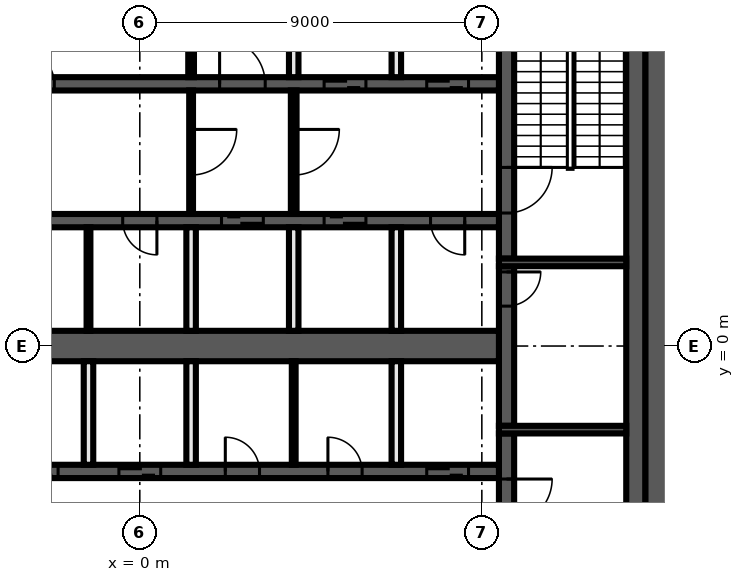
"""IFC4 building model, lengths in metres.
Left out: names, types, materials, properties, quantities, classifications, styles, units other than length and angle.
Written with IfcOpenShell. Run it as: python <this file> out.ifc"""

import sys

from ifc_helpers import new_model, si_unit, direction, frame, frame_2d, origin, place, context, subcontext, project, spatial, rectangle, extrude, element, fill, save


model = new_model("IFC4")
c1 = context("Model", 3, precision=1e-05, world=origin(), true_north=direction((0.0, 1.0)))
c2 = subcontext(c1, "Body", "Model", "MODEL_VIEW")
j1 = project(units=[si_unit("LENGTHUNIT", "METRE"), si_unit("PLANEANGLEUNIT", "RADIAN")], contexts=[c1])
p1 = place(None, origin())
s1 = spatial("IfcSite", under=j1, at=p1, CompositionType="ELEMENT")
p2 = place(p1, origin())
s2 = spatial("IfcBuilding", under=s1, at=p2, CompositionType="ELEMENT")
p3 = place(p2, frame((0.0, 0.0, 253.8)))
s3 = spatial("IfcBuildingStorey", under=s2, at=p3, CompositionType="ELEMENT", Elevation=253.8)
p4 = place(p3, frame((13.65, 10.3, 0.0), z_axis=(0.0, 0.0, 1.0), x_axis=(0.0, -1.0, 0.0)))
e1 = element("IfcWall", 1, at=p4, inside=s3, PredefinedType="SHEAR", context=c2, shape_type="SweptSolid", body=[
    extrude(rectangle(XDim=20.6, YDim=0.7, at=frame_2d((10.3, 0.0))), origin(), (0.0, 0.0, 1.0), 3.82),
])
p5 = place(p3, frame((13.05, 9.8, 0.0), z_axis=(0.0, 0.0, 1.0), x_axis=(0.0, -1.0, 0.0)))
e2 = element("IfcWall", 2, at=p5, inside=s3, PredefinedType="SHEAR", context=c2, shape_type="SweptSolid", body=[
    extrude(rectangle(XDim=19.6, YDim=0.5, at=frame_2d((9.8, 0.0))), origin(), (0.0, 0.0, 1.0), 3.82),
])
p6 = place(p3, frame((9.65, -2.3, 0.0), z_axis=(0.0, 0.0, 1.0), x_axis=(0.0, -1.0, 0.0)))
e3 = element("IfcWall", 3, at=p6, inside=s3, PredefinedType="SHEAR", context=c2, shape_type="SweptSolid", body=[
    extrude(rectangle(XDim=7.5, YDim=0.4, at=frame_2d((3.75, 0.0))), origin(), (0.0, 0.0, 1.0), 3.82),
])
p7 = place(p6, frame((1.2, 0.0, 0.0)))
e4 = element("IfcOpeningElement", 4, at=p7, cuts=e3, PredefinedType="OPENING", context=c2, shape_type="SweptSolid", body=[
    extrude(rectangle(XDim=1.2, YDim=2.1, at=frame_2d((0.6, 1.05))), frame((0.0, 0.21, 0.0), z_axis=(0.0, -1.0, 0.0), x_axis=(1.0, 0.0, 0.0)), (0.0, 0.0, 1.0), 0.42),
])
p8 = place(p3, frame((9.65, 2.1, 0.0), z_axis=(0.0, 0.0, 1.0), x_axis=(0.0, -1.0, 0.0)))
e5 = element("IfcWall", 5, at=p8, inside=s3, PredefinedType="SHEAR", context=c2, shape_type="SweptSolid", body=[
    extrude(rectangle(XDim=4.2, YDim=0.4, at=frame_2d((2.1, 0.0))), origin(), (0.0, 0.0, 1.0), 3.82),
])
p9 = place(p8, frame((0.15, 0.0, 0.0)))
e6 = element("IfcOpeningElement", 6, at=p9, cuts=e5, PredefinedType="OPENING", context=c2, shape_type="SweptSolid", body=[
    extrude(rectangle(XDim=0.9, YDim=2.1, at=frame_2d((0.45, 1.05))), frame((0.0, 0.21, 0.0), z_axis=(0.0, -1.0, 0.0), x_axis=(1.0, 0.0, 0.0)), (0.0, 0.0, 1.0), 0.42),
])
p10 = place(p3, frame((9.65, 9.8, 0.0), z_axis=(0.0, 0.0, 1.0), x_axis=(0.0, -1.0, 0.0)))
e7 = element("IfcWall", 7, at=p10, inside=s3, PredefinedType="SHEAR", context=c2, shape_type="SweptSolid", body=[
    extrude(rectangle(XDim=7.5, YDim=0.4, at=frame_2d((3.75, 0.0))), origin(), (0.0, 0.0, 1.0), 3.82),
])
p11 = place(p10, frame((5.1, 0.0, 0.0)))
e8 = element("IfcOpeningElement", 8, at=p11, cuts=e7, PredefinedType="OPENING", context=c2, shape_type="SweptSolid", body=[
    extrude(rectangle(XDim=1.2, YDim=2.1, at=frame_2d((0.6, 1.05))), frame((0.0, 0.21, 0.0), z_axis=(0.0, -1.0, 0.0), x_axis=(1.0, 0.0, 0.0)), (0.0, 0.0, 1.0), 0.42),
])
for number, where, z_axis, x_axis in (
    (9, (9.45, 2.2, 0.0), (0.0, 0.0, 1.0), (1.0, 0.0, 0.0)),
    (10, (9.45, -2.2, 0.0), (0.0, 0.0, 1.0), (1.0, 0.0, 0.0)),
):
    element("IfcWall", number, at=place(p3, frame(where, z_axis=z_axis, x_axis=x_axis)), inside=s3, PredefinedType="SHEAR", context=c2, shape_type="SweptSolid", body=[
        extrude(rectangle(XDim=3.35, YDim=0.2, at=frame_2d((1.675, 0.0))), origin(), (0.0, 0.0, 1.0), 3.82),
    ])
p12 = place(p3, frame((-9.45, 6.9, 0.0), z_axis=(0.0, 0.0, 1.0), x_axis=(1.0, 0.0, 0.0)))
e11 = element("IfcWall", 11, at=p12, inside=s3, PredefinedType="SHEAR", context=c2, shape_type="SweptSolid", body=[
    extrude(rectangle(XDim=18.9, YDim=0.35, at=frame_2d((9.45, 0.0))), origin(), (0.0, 0.0, 1.0), 3.82),
])
p13 = place(p12, frame((11.55, 0.0, 0.0)))
e12 = element("IfcOpeningElement", 12, at=p13, cuts=e11, PredefinedType="OPENING", context=c2, shape_type="SweptSolid", body=[
    extrude(rectangle(XDim=1.2, YDim=2.1, at=frame_2d((0.6, 1.05))), frame((0.0, 0.185, 0.0), z_axis=(0.0, -1.0, 0.0), x_axis=(1.0, 0.0, 0.0)), (0.0, 0.0, 1.0), 0.37),
])
p14 = place(p12, frame((14.3, 0.0, 0.0)))
e13 = element("IfcOpeningElement", 13, at=p14, cuts=e11, PredefinedType="OPENING", context=c2, shape_type="SweptSolid", body=[
    extrude(rectangle(XDim=1.1, YDim=2.1, at=frame_2d((0.55, 1.05))), frame((0.0, 0.185, 0.0), z_axis=(0.0, -1.0, 0.0), x_axis=(1.0, 0.0, 0.0)), (0.0, 0.0, 1.0), 0.37),
])
p15 = place(p12, frame((17.0, 0.0, 0.0)))
e14 = element("IfcOpeningElement", 14, at=p15, cuts=e11, PredefinedType="OPENING", context=c2, shape_type="SweptSolid", body=[
    extrude(rectangle(XDim=1.1, YDim=2.1, at=frame_2d((0.55, 1.05))), frame((0.0, 0.185, 0.0), z_axis=(0.0, -1.0, 0.0), x_axis=(1.0, 0.0, 0.0)), (0.0, 0.0, 1.0), 0.37),
])
p16 = place(p12, frame((0.9, 0.0, 0.0)))
e15 = element("IfcOpeningElement", 15, at=p16, cuts=e11, PredefinedType="OPENING", context=c2, shape_type="SweptSolid", body=[
    extrude(rectangle(XDim=0.9, YDim=2.1, at=frame_2d((0.45, 1.05))), frame((0.0, 0.185, 0.0), z_axis=(0.0, -1.0, 0.0), x_axis=(1.0, 0.0, 0.0)), (0.0, 0.0, 1.0), 0.37),
])
p17 = place(p12, frame((6.3, 0.0, 0.0)))
e16 = element("IfcOpeningElement", 16, at=p17, cuts=e11, PredefinedType="OPENING", context=c2, shape_type="SweptSolid", body=[
    extrude(rectangle(XDim=0.9, YDim=2.1, at=frame_2d((0.45, 1.05))), frame((0.0, 0.185, 0.0), z_axis=(0.0, -1.0, 0.0), x_axis=(1.0, 0.0, 0.0)), (0.0, 0.0, 1.0), 0.37),
])
p18 = place(p3, frame((9.45, 3.3, 0.0), z_axis=(0.0, 0.0, 1.0), x_axis=(-1.0, 0.0, 0.0)))
e17 = element("IfcWall", 17, at=p18, inside=s3, PredefinedType="SHEAR", context=c2, shape_type="SweptSolid", body=[
    extrude(rectangle(XDim=18.9, YDim=0.35, at=frame_2d((9.45, 0.0))), origin(), (0.0, 0.0, 1.0), 3.82),
])
p19 = place(p18, frame((6.2, 0.0, 0.0)))
e18 = element("IfcOpeningElement", 18, at=p19, cuts=e17, PredefinedType="OPENING", context=c2, shape_type="SweptSolid", body=[
    extrude(rectangle(XDim=1.1, YDim=2.1, at=frame_2d((0.55, 1.05))), frame((0.0, 0.185, 0.0), z_axis=(0.0, -1.0, 0.0), x_axis=(1.0, 0.0, 0.0)), (0.0, 0.0, 1.0), 0.37),
])
p20 = place(p18, frame((3.5, 0.0, 0.0)))
e19 = element("IfcOpeningElement", 19, at=p20, cuts=e17, PredefinedType="OPENING", context=c2, shape_type="SweptSolid", body=[
    extrude(rectangle(XDim=1.1, YDim=2.1, at=frame_2d((0.55, 1.05))), frame((0.0, 0.185, 0.0), z_axis=(0.0, -1.0, 0.0), x_axis=(1.0, 0.0, 0.0)), (0.0, 0.0, 1.0), 0.37),
])
p21 = place(p18, frame((0.9, 0.0, 0.0)))
e20 = element("IfcOpeningElement", 20, at=p21, cuts=e17, PredefinedType="OPENING", context=c2, shape_type="SweptSolid", body=[
    extrude(rectangle(XDim=0.9, YDim=2.1, at=frame_2d((0.45, 1.05))), frame((0.0, 0.185, 0.0), z_axis=(0.0, -1.0, 0.0), x_axis=(1.0, 0.0, 0.0)), (0.0, 0.0, 1.0), 0.37),
])
p22 = place(p18, frame((14.4, 0.0, 0.0)))
e21 = element("IfcOpeningElement", 21, at=p22, cuts=e17, PredefinedType="OPENING", context=c2, shape_type="SweptSolid", body=[
    extrude(rectangle(XDim=0.9, YDim=2.1, at=frame_2d((0.45, 1.05))), frame((0.0, 0.185, 0.0), z_axis=(0.0, -1.0, 0.0), x_axis=(1.0, 0.0, 0.0)), (0.0, 0.0, 1.0), 0.37),
])
p23 = place(p18, frame((9.0, 0.0, 0.0)))
e22 = element("IfcOpeningElement", 22, at=p23, cuts=e17, PredefinedType="OPENING", context=c2, shape_type="SweptSolid", body=[
    extrude(rectangle(XDim=0.9, YDim=2.1, at=frame_2d((0.45, 1.05))), frame((0.0, 0.185, 0.0), z_axis=(0.0, -1.0, 0.0), x_axis=(1.0, 0.0, 0.0)), (0.0, 0.0, 1.0), 0.37),
])
p24 = place(p3, frame((-9.45, -3.3, 0.0), z_axis=(0.0, 0.0, 1.0), x_axis=(1.0, 0.0, 0.0)))
e23 = element("IfcWall", 23, at=p24, inside=s3, PredefinedType="SHEAR", context=c2, shape_type="SweptSolid", body=[
    extrude(rectangle(XDim=18.9, YDim=0.35, at=frame_2d((9.45, 0.0))), origin(), (0.0, 0.0, 1.0), 3.82),
])
p25 = place(p24, frame((0.8, 0.0, 0.0)))
e24 = element("IfcOpeningElement", 24, at=p25, cuts=e23, PredefinedType="OPENING", context=c2, shape_type="SweptSolid", body=[
    extrude(rectangle(XDim=1.1, YDim=2.1, at=frame_2d((0.55, 1.05))), frame((0.0, 0.185, 0.0), z_axis=(0.0, -1.0, 0.0), x_axis=(1.0, 0.0, 0.0)), (0.0, 0.0, 1.0), 0.37),
])
p26 = place(p24, frame((3.5, 0.0, 0.0)))
e25 = element("IfcOpeningElement", 25, at=p26, cuts=e23, PredefinedType="OPENING", context=c2, shape_type="SweptSolid", body=[
    extrude(rectangle(XDim=1.1, YDim=2.1, at=frame_2d((0.55, 1.05))), frame((0.0, 0.185, 0.0), z_axis=(0.0, -1.0, 0.0), x_axis=(1.0, 0.0, 0.0)), (0.0, 0.0, 1.0), 0.37),
])
p27 = place(p24, frame((6.2, 0.0, 0.0)))
e26 = element("IfcOpeningElement", 26, at=p27, cuts=e23, PredefinedType="OPENING", context=c2, shape_type="SweptSolid", body=[
    extrude(rectangle(XDim=1.1, YDim=2.1, at=frame_2d((0.55, 1.05))), frame((0.0, 0.185, 0.0), z_axis=(0.0, -1.0, 0.0), x_axis=(1.0, 0.0, 0.0)), (0.0, 0.0, 1.0), 0.37),
])
p28 = place(p24, frame((8.9, 0.0, 0.0)))
e27 = element("IfcOpeningElement", 27, at=p28, cuts=e23, PredefinedType="OPENING", context=c2, shape_type="SweptSolid", body=[
    extrude(rectangle(XDim=1.1, YDim=2.1, at=frame_2d((0.55, 1.05))), frame((0.0, 0.185, 0.0), z_axis=(0.0, -1.0, 0.0), x_axis=(1.0, 0.0, 0.0)), (0.0, 0.0, 1.0), 0.37),
])
p29 = place(p24, frame((17.0, 0.0, 0.0)))
e28 = element("IfcOpeningElement", 28, at=p29, cuts=e23, PredefinedType="OPENING", context=c2, shape_type="SweptSolid", body=[
    extrude(rectangle(XDim=1.1, YDim=2.1, at=frame_2d((0.55, 1.05))), frame((0.0, 0.185, 0.0), z_axis=(0.0, -1.0, 0.0), x_axis=(1.0, 0.0, 0.0)), (0.0, 0.0, 1.0), 0.37),
])
p30 = place(p24, frame((11.7, 0.0, 0.0)))
e29 = element("IfcOpeningElement", 29, at=p30, cuts=e23, PredefinedType="OPENING", context=c2, shape_type="SweptSolid", body=[
    extrude(rectangle(XDim=0.9, YDim=2.1, at=frame_2d((0.45, 1.05))), frame((0.0, 0.185, 0.0), z_axis=(0.0, -1.0, 0.0), x_axis=(1.0, 0.0, 0.0)), (0.0, 0.0, 1.0), 0.37),
])
p31 = place(p24, frame((14.4, 0.0, 0.0)))
e30 = element("IfcOpeningElement", 30, at=p31, cuts=e23, PredefinedType="OPENING", context=c2, shape_type="SweptSolid", body=[
    extrude(rectangle(XDim=0.9, YDim=2.1, at=frame_2d((0.45, 1.05))), frame((0.0, 0.185, 0.0), z_axis=(0.0, -1.0, 0.0), x_axis=(1.0, 0.0, 0.0)), (0.0, 0.0, 1.0), 0.37),
])
p32 = place(p3, frame((-9.45, 0.0, 0.0), z_axis=(0.0, 0.0, 1.0), x_axis=(1.0, 0.0, 0.0)))
e31 = element("IfcWall", 31, at=p32, inside=s3, PredefinedType="SHEAR", context=c2, shape_type="SweptSolid", body=[
    extrude(rectangle(XDim=18.9, YDim=0.8, at=frame_2d((9.45, 0.0))), origin(), (0.0, 0.0, 1.0), 3.82),
])
for number, where, z_axis, x_axis in (
    (32, (6.75, -3.125, 0.0), (0.0, 0.0, 1.0), (0.0, 1.0, 0.0)),
    (33, (6.75, 0.4, 0.0), (0.0, 0.0, 1.0), (0.0, 1.0, 0.0)),
    (34, (6.75, 7.075, 0.0), (0.0, 0.0, 1.0), (0.0, 1.0, 0.0)),
):
    element("IfcWall", number, at=place(p3, frame(where, z_axis=z_axis, x_axis=x_axis)), inside=s3, PredefinedType="SOLIDWALL", context=c2, shape_type="SweptSolid", body=[
        extrude(rectangle(XDim=2.725, YDim=0.25, at=frame_2d((1.363, 0.0))), origin(), (0.0, 0.0, 1.0), 3.82),
    ])
p33 = place(p3, frame((4.05, 6.725, 0.0), z_axis=(0.0, 0.0, 1.0), x_axis=(0.0, -1.0, 0.0)))
e35 = element("IfcWall", 35, at=p33, inside=s3, PredefinedType="PARTITIONING", context=c2, shape_type="SweptSolid", body=[
    extrude(rectangle(XDim=3.25, YDim=0.15, at=frame_2d((1.625, 0.0))), origin(), (0.0, 0.0, 1.0), 3.82),
])
p34 = place(p33, frame((1.025, 0.0, 0.0)))
e36 = element("IfcOpeningElement", 36, at=p34, cuts=e35, PredefinedType="OPENING", context=c2, shape_type="SweptSolid", body=[
    extrude(rectangle(XDim=1.2, YDim=2.1, at=frame_2d((0.6, 1.05))), frame((0.0, 0.085, 0.0), z_axis=(0.0, -1.0, 0.0), x_axis=(1.0, 0.0, 0.0)), (0.0, 0.0, 1.0), 0.17),
])
p35 = place(p3, frame((4.05, -3.125, 0.0), z_axis=(0.0, 0.0, 1.0), x_axis=(0.0, 1.0, 0.0)))
e37 = element("IfcWall", 37, at=p35, inside=s3, PredefinedType="PARTITIONING", context=c2, shape_type="SweptSolid", body=[
    extrude(rectangle(XDim=2.725, YDim=0.1, at=frame_2d((1.363, 0.0))), origin(), (0.0, 0.0, 1.0), 3.82),
])
for number, where, z_axis, x_axis in (
    (38, (4.05, 0.4, 0.0), (0.0, 0.0, 1.0), (0.0, 1.0, 0.0)),
    (39, (4.05, 7.075, 0.0), (0.0, 0.0, 1.0), (0.0, 1.0, 0.0)),
):
    element("IfcWall", number, at=place(p3, frame(where, z_axis=z_axis, x_axis=x_axis)), inside=s3, PredefinedType="SOLIDWALL", context=c2, shape_type="SweptSolid", body=[
        extrude(rectangle(XDim=2.725, YDim=0.25, at=frame_2d((1.363, 0.0))), origin(), (0.0, 0.0, 1.0), 3.82),
    ])
p36 = place(p3, frame((1.35, 7.075, 0.0), z_axis=(0.0, 0.0, 1.0), x_axis=(0.0, 1.0, 0.0)))
e40 = element("IfcWall", 40, at=p36, inside=s3, PredefinedType="PARTITIONING", context=c2, shape_type="SweptSolid", body=[
    extrude(rectangle(XDim=2.725, YDim=0.15, at=frame_2d((1.363, 0.0))), origin(), (0.0, 0.0, 1.0), 3.82),
])
p37 = place(p3, frame((1.35, 6.725, 0.0), z_axis=(0.0, 0.0, 1.0), x_axis=(0.0, -1.0, 0.0)))
e41 = element("IfcWall", 41, at=p37, inside=s3, PredefinedType="PARTITIONING", context=c2, shape_type="SweptSolid", body=[
    extrude(rectangle(XDim=3.25, YDim=0.1, at=frame_2d((1.625, 0.0))), origin(), (0.0, 0.0, 1.0), 3.82),
])
p38 = place(p37, frame((1.025, 0.0, 0.0)))
e42 = element("IfcOpeningElement", 42, at=p38, cuts=e41, PredefinedType="OPENING", context=c2, shape_type="SweptSolid", body=[
    extrude(rectangle(XDim=1.2, YDim=2.1, at=frame_2d((0.6, 1.05))), frame((0.0, 0.06, 0.0), z_axis=(0.0, -1.0, 0.0), x_axis=(1.0, 0.0, 0.0)), (0.0, 0.0, 1.0), 0.12),
])
for number, where, z_axis, x_axis in (
    (43, (1.35, -3.125, 0.0), (0.0, 0.0, 1.0), (0.0, 1.0, 0.0)),
    (44, (1.35, 0.4, 0.0), (0.0, 0.0, 1.0), (0.0, 1.0, 0.0)),
):
    element("IfcWall", number, at=place(p3, frame(where, z_axis=z_axis, x_axis=x_axis)), inside=s3, PredefinedType="SOLIDWALL", context=c2, shape_type="SweptSolid", body=[
        extrude(rectangle(XDim=2.725, YDim=0.25, at=frame_2d((1.363, 0.0))), origin(), (0.0, 0.0, 1.0), 3.82),
    ])
p39 = place(p3, frame((-1.35, 0.4, 0.0), z_axis=(0.0, 0.0, 1.0), x_axis=(0.0, 1.0, 0.0)))
e45 = element("IfcWall", 45, at=p39, inside=s3, PredefinedType="PARTITIONING", context=c2, shape_type="SweptSolid", body=[
    extrude(rectangle(XDim=2.725, YDim=0.1, at=frame_2d((1.363, 0.0))), origin(), (0.0, 0.0, 1.0), 3.82),
])
p40 = place(p3, frame((-1.35, -3.125, 0.0), z_axis=(0.0, 0.0, 1.0), x_axis=(0.0, 1.0, 0.0)))
e46 = element("IfcWall", 46, at=p40, inside=s3, PredefinedType="SOLIDWALL", context=c2, shape_type="SweptSolid", body=[
    extrude(rectangle(XDim=2.725, YDim=0.25, at=frame_2d((1.363, 0.0))), origin(), (0.0, 0.0, 1.0), 3.82),
])
p41 = place(p9, origin())
e47 = element("IfcDoor", 47, at=p41, inside=s3, OperationType="SINGLE_SWING_RIGHT", PredefinedType="DOOR", context=c2, shape_type="SweptSolid", body=[
    extrude(rectangle(XDim=0.9, YDim=2.1, at=frame_2d((0.45, 1.05))), frame((0.0, 0.025, 0.0), z_axis=(0.0, -1.0, 0.0), x_axis=(1.0, 0.0, 0.0)), (0.0, 0.0, 1.0), 0.05),
])
fill(e6, e47)
p42 = place(p13, origin())
e48 = element("IfcDoor", 48, at=p42, inside=s3, OperationType="SINGLE_SWING_LEFT", PredefinedType="DOOR", context=c2, shape_type="SweptSolid", body=[
    extrude(rectangle(XDim=1.2, YDim=2.1, at=frame_2d((0.6, 1.05))), frame((0.0, 0.025, 0.0), z_axis=(0.0, -1.0, 0.0), x_axis=(1.0, 0.0, 0.0)), (0.0, 0.0, 1.0), 0.05),
])
fill(e12, e48)
p43 = place(p14, origin())
e49 = element("IfcDoor", 49, at=p43, inside=s3, OperationType="DOUBLE_DOOR_SLIDING", PredefinedType="DOOR", context=c2, shape_type="SweptSolid", body=[
    extrude(rectangle(XDim=1.1, YDim=2.1, at=frame_2d((0.55, 1.05))), frame((0.0, 0.025, 0.0), z_axis=(0.0, -1.0, 0.0), x_axis=(1.0, 0.0, 0.0)), (0.0, 0.0, 1.0), 0.05),
])
fill(e13, e49)
p44 = place(p15, origin())
e50 = element("IfcDoor", 50, at=p44, inside=s3, OperationType="DOUBLE_DOOR_SLIDING", PredefinedType="DOOR", context=c2, shape_type="SweptSolid", body=[
    extrude(rectangle(XDim=1.1, YDim=2.1, at=frame_2d((0.55, 1.05))), frame((0.0, 0.025, 0.0), z_axis=(0.0, -1.0, 0.0), x_axis=(1.0, 0.0, 0.0)), (0.0, 0.0, 1.0), 0.05),
])
fill(e14, e50)
p45 = place(p19, origin())
e51 = element("IfcDoor", 51, at=p45, inside=s3, OperationType="DOUBLE_DOOR_SLIDING", PredefinedType="DOOR", context=c2, shape_type="SweptSolid", body=[
    extrude(rectangle(XDim=1.1, YDim=2.1, at=frame_2d((0.55, 1.05))), frame((0.0, 0.025, 0.0), z_axis=(0.0, -1.0, 0.0), x_axis=(1.0, 0.0, 0.0)), (0.0, 0.0, 1.0), 0.05),
])
fill(e18, e51)
p46 = place(p20, origin())
e52 = element("IfcDoor", 52, at=p46, inside=s3, OperationType="DOUBLE_DOOR_SLIDING", PredefinedType="DOOR", context=c2, shape_type="SweptSolid", body=[
    extrude(rectangle(XDim=1.1, YDim=2.1, at=frame_2d((0.55, 1.05))), frame((0.0, 0.025, 0.0), z_axis=(0.0, -1.0, 0.0), x_axis=(1.0, 0.0, 0.0)), (0.0, 0.0, 1.0), 0.05),
])
fill(e19, e52)
p47 = place(p21, origin())
e53 = element("IfcDoor", 53, at=p47, inside=s3, OperationType="SINGLE_SWING_LEFT", PredefinedType="DOOR", context=c2, shape_type="SweptSolid", body=[
    extrude(rectangle(XDim=0.9, YDim=2.1, at=frame_2d((0.45, 1.05))), frame((0.0, 0.025, 0.0), z_axis=(0.0, -1.0, 0.0), x_axis=(1.0, 0.0, 0.0)), (0.0, 0.0, 1.0), 0.05),
])
fill(e20, e53)
p48 = place(p27, origin())
e54 = element("IfcDoor", 54, at=p48, inside=s3, OperationType="DOUBLE_DOOR_SLIDING", PredefinedType="DOOR", context=c2, shape_type="SweptSolid", body=[
    extrude(rectangle(XDim=1.1, YDim=2.1, at=frame_2d((0.55, 1.05))), frame((0.0, 0.025, 0.0), z_axis=(0.0, -1.0, 0.0), x_axis=(1.0, 0.0, 0.0)), (0.0, 0.0, 1.0), 0.05),
])
fill(e26, e54)
p49 = place(p28, origin())
e55 = element("IfcDoor", 55, at=p49, inside=s3, OperationType="DOUBLE_DOOR_SLIDING", PredefinedType="DOOR", context=c2, shape_type="SweptSolid", body=[
    extrude(rectangle(XDim=1.1, YDim=2.1, at=frame_2d((0.55, 1.05))), frame((0.0, 0.025, 0.0), z_axis=(0.0, -1.0, 0.0), x_axis=(1.0, 0.0, 0.0)), (0.0, 0.0, 1.0), 0.05),
])
fill(e27, e55)
p50 = place(p29, origin())
e56 = element("IfcDoor", 56, at=p50, inside=s3, OperationType="DOUBLE_DOOR_SLIDING", PredefinedType="DOOR", context=c2, shape_type="SweptSolid", body=[
    extrude(rectangle(XDim=1.1, YDim=2.1, at=frame_2d((0.55, 1.05))), frame((0.0, 0.025, 0.0), z_axis=(0.0, -1.0, 0.0), x_axis=(1.0, 0.0, 0.0)), (0.0, 0.0, 1.0), 0.05),
])
fill(e28, e56)
p51 = place(p17, origin())
e57 = element("IfcDoor", 57, at=p51, inside=s3, OperationType="SINGLE_SWING_LEFT", PredefinedType="DOOR", context=c2, shape_type="SweptSolid", body=[
    extrude(rectangle(XDim=0.9, YDim=2.1, at=frame_2d((0.45, 1.05))), frame((0.0, 0.025, 0.0), z_axis=(0.0, -1.0, 0.0), x_axis=(1.0, 0.0, 0.0)), (0.0, 0.0, 1.0), 0.05),
])
fill(e16, e57)
p52 = place(p23, origin())
e58 = element("IfcDoor", 58, at=p52, inside=s3, OperationType="SINGLE_SWING_LEFT", PredefinedType="DOOR", context=c2, shape_type="SweptSolid", body=[
    extrude(rectangle(XDim=0.9, YDim=2.1, at=frame_2d((0.45, 1.05))), frame((0.0, 0.025, 0.0), z_axis=(0.0, -1.0, 0.0), x_axis=(1.0, 0.0, 0.0)), (0.0, 0.0, 1.0), 0.05),
])
fill(e22, e58)
p53 = place(p30, origin())
e59 = element("IfcDoor", 59, at=p53, inside=s3, OperationType="SINGLE_SWING_RIGHT", PredefinedType="DOOR", context=c2, shape_type="SweptSolid", body=[
    extrude(rectangle(XDim=0.9, YDim=2.1, at=frame_2d((0.45, 1.05))), frame((0.0, 0.025, 0.0), z_axis=(0.0, -1.0, 0.0), x_axis=(1.0, 0.0, 0.0)), (0.0, 0.0, 1.0), 0.05),
])
fill(e29, e59)
p54 = place(p31, origin())
e60 = element("IfcDoor", 60, at=p54, inside=s3, OperationType="SINGLE_SWING_LEFT", PredefinedType="DOOR", context=c2, shape_type="SweptSolid", body=[
    extrude(rectangle(XDim=0.9, YDim=2.1, at=frame_2d((0.45, 1.05))), frame((0.0, 0.025, 0.0), z_axis=(0.0, -1.0, 0.0), x_axis=(1.0, 0.0, 0.0)), (0.0, 0.0, 1.0), 0.05),
])
fill(e30, e60)
p55 = place(p11, origin())
e61 = element("IfcDoor", 61, at=p55, inside=s3, OperationType="SINGLE_SWING_LEFT", PredefinedType="DOOR", context=c2, shape_type="SweptSolid", body=[
    extrude(rectangle(XDim=1.2, YDim=2.1, at=frame_2d((0.6, 1.05))), frame((0.0, 0.025, 0.0), z_axis=(0.0, -1.0, 0.0), x_axis=(1.0, 0.0, 0.0)), (0.0, 0.0, 1.0), 0.05),
])
fill(e8, e61)
p56 = place(p7, origin())
e62 = element("IfcDoor", 62, at=p56, inside=s3, OperationType="SINGLE_SWING_RIGHT", PredefinedType="DOOR", context=c2, shape_type="SweptSolid", body=[
    extrude(rectangle(XDim=1.2, YDim=2.1, at=frame_2d((0.6, 1.05))), frame((0.0, 0.025, 0.0), z_axis=(0.0, -1.0, 0.0), x_axis=(1.0, 0.0, 0.0)), (0.0, 0.0, 1.0), 0.05),
])
fill(e4, e62)
p57 = place(p38, origin())
e63 = element("IfcDoor", 63, at=p57, inside=s3, OperationType="SINGLE_SWING_LEFT", PredefinedType="DOOR", context=c2, shape_type="SweptSolid", body=[
    extrude(rectangle(XDim=1.2, YDim=2.1, at=frame_2d((0.6, 1.05))), frame((0.0, 0.025, 0.0), z_axis=(0.0, -1.0, 0.0), x_axis=(1.0, 0.0, 0.0)), (0.0, 0.0, 1.0), 0.05),
])
fill(e42, e63)
p58 = place(p34, origin())
e64 = element("IfcDoor", 64, at=p58, inside=s3, OperationType="SINGLE_SWING_RIGHT", PredefinedType="DOOR", context=c2, shape_type="SweptSolid", body=[
    extrude(rectangle(XDim=1.2, YDim=2.1, at=frame_2d((0.6, 1.05))), frame((0.0, 0.025, 0.0), z_axis=(0.0, -1.0, 0.0), x_axis=(1.0, 0.0, 0.0)), (0.0, 0.0, 1.0), 0.05),
])
fill(e36, e64)
save(model, sys.argv[1])
